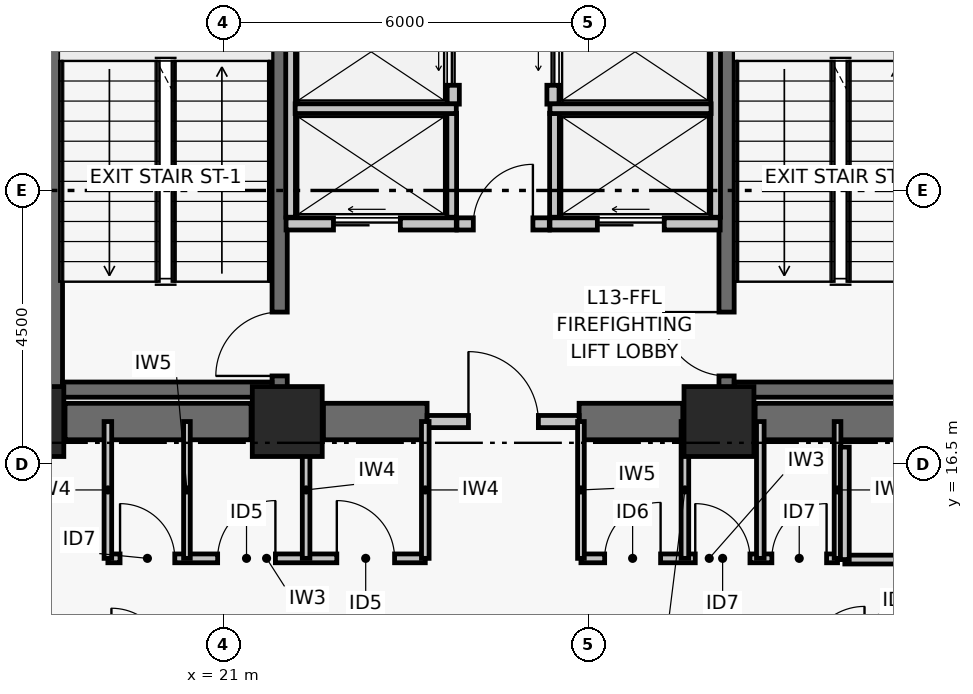
"""IFC4 building model, lengths in metres.
Left out: names, types, materials, properties, quantities, classifications, styles, units other than length and angle.
Written with IfcOpenShell. Run it as: python <this file> out.ifc"""

import sys

from ifc_helpers import new_model, si_unit, direction, frame, frame_2d, origin, origin_2d, place, context, subcontext, project, spatial, rectangle, extrude, element, fill, save


model = new_model("IFC4")
c1 = context("Model", 3, precision=1e-05, world=origin(), true_north=direction((0.0, 1.0)))
c2 = subcontext(c1, "Body", "Model", "MODEL_VIEW")
j1 = project(units=[si_unit("LENGTHUNIT", "METRE"), si_unit("PLANEANGLEUNIT", "RADIAN")], contexts=[c1])
p1 = place(None, origin())
s1 = spatial("IfcSite", under=j1, at=p1, CompositionType="ELEMENT")
p2 = place(p1, origin())
s2 = spatial("IfcBuilding", under=s1, at=p2, CompositionType="ELEMENT")
p3 = place(p2, frame((0.0, 0.0, 57.36)))
s3 = spatial("IfcBuildingStorey", under=s2, at=p3, CompositionType="ELEMENT", Elevation=57.36)
for number, where, z_axis, x_axis in (
    (1, (17.8, 17.2, 0.0), (0.0, 0.0, 1.0), (1.0, 0.0, 0.0)),
    (2, (22.05, 17.2, 0.0), (0.0, 0.0, 1.0), (1.0, 0.0, 0.0)),
    (3, (29.15, 17.2, 0.0), (0.0, 0.0, 1.0), (1.0, 0.0, 0.0)),
):
    element("IfcColumn", number, at=place(p3, frame(where, z_axis=z_axis, x_axis=x_axis)), inside=s3, PredefinedType="COLUMN", context=c2, shape_type="SweptSolid", body=[
        extrude(rectangle(XDim=1.15, YDim=1.15, at=origin_2d()), origin(), (0.0, 0.0, 1.0), 3.72),
    ])
p4 = place(p3, frame((18.395, 17.2, 0.0), z_axis=(0.0, 0.0, 1.0), x_axis=(1.0, 0.0, 0.0)))
e4 = element("IfcWall", 4, at=p4, inside=s3, PredefinedType="SHEAR", context=c2, shape_type="SweptSolid", body=[
    extrude(rectangle(XDim=3.06, YDim=0.6, at=frame_2d((1.53, 0.0))), origin(), (0.0, 0.0, 1.0), 3.47),
])
p5 = place(p3, frame((22.645, 17.2, 0.0), z_axis=(0.0, 0.0, 1.0), x_axis=(1.0, 0.0, 0.0)))
e5 = element("IfcWall", 5, at=p5, inside=s3, PredefinedType="SHEAR", context=c2, shape_type="SweptSolid", body=[
    extrude(rectangle(XDim=1.705, YDim=0.6, at=frame_2d((0.853, 0.0))), origin(), (0.0, 0.0, 1.0), 3.47),
])
p6 = place(p3, frame((26.85, 17.2, 0.0), z_axis=(0.0, 0.0, 1.0), x_axis=(1.0, 0.0, 0.0)))
e6 = element("IfcWall", 6, at=p6, inside=s3, PredefinedType="SHEAR", context=c2, shape_type="SweptSolid", body=[
    extrude(rectangle(XDim=1.705, YDim=0.6, at=frame_2d((0.853, 0.0))), origin(), (0.0, 0.0, 1.0), 3.47),
])
p7 = place(p3, frame((29.745, 17.2, 0.0), z_axis=(0.0, 0.0, 1.0), x_axis=(1.0, 0.0, 0.0)))
e7 = element("IfcWall", 7, at=p7, inside=s3, PredefinedType="SHEAR", context=c2, shape_type="SweptSolid", body=[
    extrude(rectangle(XDim=3.06, YDim=0.6, at=frame_2d((1.53, 0.0))), origin(), (0.0, 0.0, 1.0), 3.47),
])
p8 = place(p3, frame((18.229, 17.6, 0.0), z_axis=(0.0, 0.0, 1.0), x_axis=(0.0, 1.0, 0.0)))
e8 = element("IfcWall", 8, at=p8, inside=s3, PredefinedType="SHEAR", context=c2, shape_type="SweptSolid", body=[
    extrude(rectangle(XDim=8.8, YDim=0.25, at=frame_2d((4.4, 0.0))), origin(), (0.0, 0.0, 1.0), 3.47),
])
p9 = place(p3, frame((21.925, 17.6, 0.0), z_axis=(0.0, 0.0, 1.0), x_axis=(0.0, 1.0, 0.0)))
e9 = element("IfcWall", 9, at=p9, inside=s3, PredefinedType="SHEAR", context=c2, shape_type="SweptSolid", body=[
    extrude(rectangle(XDim=8.8, YDim=0.25, at=frame_2d((4.4, 0.0))), origin(), (0.0, 0.0, 1.0), 3.47),
])
p10 = place(p9, frame((0.35, 0.0, 0.0)))
e10 = element("IfcOpeningElement", 10, at=p10, cuts=e9, PredefinedType="OPENING", context=c2, shape_type="SweptSolid", body=[
    extrude(rectangle(XDim=1.05, YDim=2.08, at=frame_2d((0.525, 1.04))), frame((0.0, 0.135, 0.0), z_axis=(0.0, -1.0, 0.0), x_axis=(1.0, 0.0, 0.0)), (0.0, 0.0, 1.0), 0.27),
])
p11 = place(p3, frame((18.354, 17.725, 0.0), z_axis=(0.0, 0.0, 1.0), x_axis=(1.0, 0.0, 0.0)))
e11 = element("IfcWall", 11, at=p11, inside=s3, PredefinedType="SHEAR", context=c2, shape_type="SweptSolid", body=[
    extrude(rectangle(XDim=3.446, YDim=0.25, at=frame_2d((1.723, 0.0))), origin(), (0.0, 0.0, 1.0), 3.47),
])
p12 = place(p3, frame((29.275, 17.6, 0.0), z_axis=(0.0, 0.0, 1.0), x_axis=(0.0, 1.0, 0.0)))
e12 = element("IfcWall", 12, at=p12, inside=s3, PredefinedType="SHEAR", context=c2, shape_type="SweptSolid", body=[
    extrude(rectangle(XDim=8.8, YDim=0.25, at=frame_2d((4.4, 0.0))), origin(), (0.0, 0.0, 1.0), 3.47),
])
p13 = place(p12, frame((0.35, 0.0, 0.0)))
e13 = element("IfcOpeningElement", 13, at=p13, cuts=e12, PredefinedType="OPENING", context=c2, shape_type="SweptSolid", body=[
    extrude(rectangle(XDim=1.05, YDim=2.08, at=frame_2d((0.525, 1.04))), frame((0.0, 0.135, 0.0), z_axis=(0.0, -1.0, 0.0), x_axis=(1.0, 0.0, 0.0)), (0.0, 0.0, 1.0), 0.27),
])
p14 = place(p3, frame((29.4, 17.725, 0.0), z_axis=(0.0, 0.0, 1.0), x_axis=(1.0, 0.0, 0.0)))
e14 = element("IfcWall", 14, at=p14, inside=s3, PredefinedType="SHEAR", context=c2, shape_type="SweptSolid", body=[
    extrude(rectangle(XDim=3.446, YDim=0.25, at=frame_2d((1.723, 0.0))), origin(), (0.0, 0.0, 1.0), 3.47),
])
p15 = place(p3, frame((24.35, 17.2, 0.0), z_axis=(0.0, 0.0, 1.0), x_axis=(1.0, 0.0, 0.0)))
e15 = element("IfcWall", 15, at=p15, inside=s3, PredefinedType="PARTITIONING", context=c2, shape_type="SweptSolid", body=[
    extrude(rectangle(XDim=2.5, YDim=0.2, at=frame_2d((1.25, 0.0))), origin(), (0.0, 0.0, 1.0), 2.6),
])
p16 = place(p15, frame((0.68, 0.0, 0.0)))
e16 = element("IfcOpeningElement", 16, at=p16, cuts=e15, PredefinedType="OPENING", context=c2, shape_type="SweptSolid", body=[
    extrude(rectangle(XDim=1.15, YDim=2.08, at=frame_2d((0.575, 1.04))), frame((0.0, 0.11, 0.0), z_axis=(0.0, -1.0, 0.0), x_axis=(1.0, 0.0, 0.0)), (0.0, 0.0, 1.0), 0.22),
])
p17 = place(p3, frame((24.84, 20.45, 0.0), z_axis=(0.0, 0.0, 1.0), x_axis=(1.0, 0.0, 0.0)))
e17 = element("IfcWall", 17, at=p17, inside=s3, PredefinedType="PARTITIONING", context=c2, shape_type="SweptSolid", body=[
    extrude(rectangle(XDim=1.52, YDim=0.2, at=frame_2d((0.76, 0.0))), origin(), (0.0, 0.0, 1.0), 3.47),
])
p18 = place(p17, frame((0.27, 0.0, 0.0)))
e18 = element("IfcOpeningElement", 18, at=p18, cuts=e17, PredefinedType="OPENING", context=c2, shape_type="SweptSolid", body=[
    extrude(rectangle(XDim=0.98, YDim=2.06, at=frame_2d((0.49, 1.03))), frame((0.0, 0.11, 0.0), z_axis=(0.0, -1.0, 0.0), x_axis=(1.0, 0.0, 0.0)), (0.0, 0.0, 1.0), 0.22),
])
p19 = place(p3, frame((22.03, 20.45, 0.0), z_axis=(0.0, 0.0, 1.0), x_axis=(1.0, 0.0, 0.0)))
e19 = element("IfcWall", 19, at=p19, inside=s3, PredefinedType="PARTITIONING", context=c2, shape_type="SweptSolid", body=[
    extrude(rectangle(XDim=2.8, YDim=0.2, at=frame_2d((1.4, 0.0))), origin(), (0.0, 0.0, 1.0), 3.47),
])
p20 = place(p19, frame((0.78, 0.0, 0.0)))
e20 = element("IfcOpeningElement", 20, at=p20, cuts=e19, PredefinedType="OPENING", context=c2, shape_type="SweptSolid", body=[
    extrude(rectangle(XDim=1.1, YDim=2.08, at=frame_2d((0.55, 1.04))), frame((0.0, 0.11, 0.0), z_axis=(0.0, -1.0, 0.0), x_axis=(1.0, 0.0, 0.0)), (0.0, 0.0, 1.0), 0.22),
])
p21 = place(p3, frame((26.37, 20.45, 0.0), z_axis=(0.0, 0.0, 1.0), x_axis=(1.0, 0.0, 0.0)))
e21 = element("IfcWall", 21, at=p21, inside=s3, PredefinedType="PARTITIONING", context=c2, shape_type="SweptSolid", body=[
    extrude(rectangle(XDim=2.8, YDim=0.2, at=frame_2d((1.4, 0.0))), origin(), (0.0, 0.0, 1.0), 3.47),
])
p22 = place(p21, frame((0.78, 0.0, 0.0)))
e22 = element("IfcOpeningElement", 22, at=p22, cuts=e21, PredefinedType="OPENING", context=c2, shape_type="SweptSolid", body=[
    extrude(rectangle(XDim=1.1, YDim=2.08, at=frame_2d((0.55, 1.04))), frame((0.0, 0.11, 0.0), z_axis=(0.0, -1.0, 0.0), x_axis=(1.0, 0.0, 0.0)), (0.0, 0.0, 1.0), 0.22),
])
p23 = place(p3, frame((24.78, 22.42, 0.0), z_axis=(0.0, 0.0, 1.0), x_axis=(0.0, 1.0, 0.0)))
e23 = element("IfcWall", 23, at=p23, inside=s3, PredefinedType="PARTITIONING", context=c2, shape_type="SweptSolid", body=[
    extrude(rectangle(XDim=1.72, YDim=0.2, at=frame_2d((0.86, 0.0))), origin(), (0.0, 0.0, 1.0), 3.47),
])
p24 = place(p23, frame((0.31, 0.0, 0.0)))
e24 = element("IfcOpeningElement", 24, at=p24, cuts=e23, PredefinedType="OPENING", context=c2, shape_type="SweptSolid", body=[
    extrude(rectangle(XDim=1.1, YDim=2.08, at=frame_2d((0.55, 1.04))), frame((0.0, 0.11, 0.0), z_axis=(0.0, -1.0, 0.0), x_axis=(1.0, 0.0, 0.0)), (0.0, 0.0, 1.0), 0.22),
])
p25 = place(p3, frame((26.42, 22.42, 0.0), z_axis=(0.0, 0.0, 1.0), x_axis=(0.0, 1.0, 0.0)))
e25 = element("IfcWall", 25, at=p25, inside=s3, PredefinedType="PARTITIONING", context=c2, shape_type="SweptSolid", body=[
    extrude(rectangle(XDim=1.72, YDim=0.2, at=frame_2d((0.86, 0.0))), origin(), (0.0, 0.0, 1.0), 3.47),
])
p26 = place(p25, frame((0.31, 0.0, 0.0)))
e26 = element("IfcOpeningElement", 26, at=p26, cuts=e25, PredefinedType="OPENING", context=c2, shape_type="SweptSolid", body=[
    extrude(rectangle(XDim=1.1, YDim=2.08, at=frame_2d((0.55, 1.04))), frame((0.0, 0.11, 0.0), z_axis=(0.0, -1.0, 0.0), x_axis=(1.0, 0.0, 0.0)), (0.0, 0.0, 1.0), 0.22),
])
p27 = place(p3, frame((22.105, 20.56, 0.0), z_axis=(0.0, 0.0, 1.0), x_axis=(0.0, 1.0, 0.0)))
e27 = element("IfcWall", 27, at=p27, inside=s3, PredefinedType="PARTITIONING", context=c2, shape_type="SweptSolid", body=[
    extrude(rectangle(XDim=5.45, YDim=0.16, at=frame_2d((2.725, 0.0))), origin(), (0.0, 0.0, 1.0), 3.47),
])
p28 = place(p3, frame((24.755, 20.56, 0.0), z_axis=(0.0, 0.0, 1.0), x_axis=(0.0, 1.0, 0.0)))
e28 = element("IfcWall", 28, at=p28, inside=s3, PredefinedType="PARTITIONING", context=c2, shape_type="SweptSolid", body=[
    extrude(rectangle(XDim=1.71, YDim=0.16, at=frame_2d((0.855, 0.0))), origin(), (0.0, 0.0, 1.0), 3.47),
])
p29 = place(p3, frame((22.18, 22.345, 0.0), z_axis=(0.0, 0.0, 1.0), x_axis=(1.0, 0.0, 0.0)))
e29 = element("IfcWall", 29, at=p29, inside=s3, PredefinedType="PARTITIONING", context=c2, shape_type="SweptSolid", body=[
    extrude(rectangle(XDim=2.65, YDim=0.16, at=frame_2d((1.325, 0.0))), origin(), (0.0, 0.0, 1.0), 3.47),
])
p30 = place(p3, frame((29.095, 20.56, 0.0), z_axis=(0.0, 0.0, 1.0), x_axis=(0.0, 1.0, 0.0)))
e30 = element("IfcWall", 30, at=p30, inside=s3, PredefinedType="PARTITIONING", context=c2, shape_type="SweptSolid", body=[
    extrude(rectangle(XDim=5.45, YDim=0.16, at=frame_2d((2.725, 0.0))), origin(), (0.0, 0.0, 1.0), 3.47),
])
p31 = place(p3, frame((26.445, 20.56, 0.0), z_axis=(0.0, 0.0, 1.0), x_axis=(0.0, 1.0, 0.0)))
e31 = element("IfcWall", 31, at=p31, inside=s3, PredefinedType="PARTITIONING", context=c2, shape_type="SweptSolid", body=[
    extrude(rectangle(XDim=1.71, YDim=0.16, at=frame_2d((0.855, 0.0))), origin(), (0.0, 0.0, 1.0), 3.47),
])
p32 = place(p3, frame((26.37, 22.345, 0.0), z_axis=(0.0, 0.0, 1.0), x_axis=(1.0, 0.0, 0.0)))
e32 = element("IfcWall", 32, at=p32, inside=s3, PredefinedType="PARTITIONING", context=c2, shape_type="SweptSolid", body=[
    extrude(rectangle(XDim=2.65, YDim=0.16, at=frame_2d((1.325, 0.0))), origin(), (0.0, 0.0, 1.0), 3.47),
])
p33 = place(p3, frame((19.1, 14.95, 0.0), z_axis=(0.0, 0.0, 1.0), x_axis=(1.0, 0.0, 0.0)))
e33 = element("IfcWall", 33, at=p33, inside=s3, PredefinedType="PARTITIONING", context=c2, shape_type="SweptSolid", body=[
    extrude(rectangle(XDim=5.22, YDim=0.145, at=frame_2d((2.61, 0.0))), origin(), (0.0, 0.0, 1.0), 2.6),
])
p34 = place(p33, frame((0.2, 0.0, 0.0)))
e34 = element("IfcOpeningElement", 34, at=p34, cuts=e33, PredefinedType="OPENING", context=c2, shape_type="SweptSolid", body=[
    extrude(rectangle(XDim=0.9, YDim=2.02, at=frame_2d((0.45, 1.01))), frame((0.0, 0.083, 0.0), z_axis=(0.0, -1.0, 0.0), x_axis=(1.0, 0.0, 0.0)), (0.0, 0.0, 1.0), 0.165),
])
p35 = place(p33, frame((1.805, 0.0, 0.0)))
e35 = element("IfcOpeningElement", 35, at=p35, cuts=e33, PredefinedType="OPENING", context=c2, shape_type="SweptSolid", body=[
    extrude(rectangle(XDim=0.95, YDim=2.06, at=frame_2d((0.475, 1.03))), frame((0.0, 0.083, 0.0), z_axis=(0.0, -1.0, 0.0), x_axis=(1.0, 0.0, 0.0)), (0.0, 0.0, 1.0), 0.165),
])
p36 = place(p33, frame((3.765, 0.0, 0.0)))
e36 = element("IfcOpeningElement", 36, at=p36, cuts=e33, PredefinedType="OPENING", context=c2, shape_type="SweptSolid", body=[
    extrude(rectangle(XDim=0.95, YDim=2.06, at=frame_2d((0.475, 1.03))), frame((0.0, 0.083, 0.0), z_axis=(0.0, -1.0, 0.0), x_axis=(1.0, 0.0, 0.0)), (0.0, 0.0, 1.0), 0.165),
])
p37 = place(p3, frame((26.88, 14.95, 0.0), z_axis=(0.0, 0.0, 1.0), x_axis=(1.0, 0.0, 0.0)))
e37 = element("IfcWall", 37, at=p37, inside=s3, PredefinedType="PARTITIONING", context=c2, shape_type="SweptSolid", body=[
    extrude(rectangle(XDim=4.22, YDim=0.145, at=frame_2d((2.11, 0.0))), origin(), (0.0, 0.0, 1.0), 3.0),
])
p38 = place(p37, frame((0.39, 0.0, 0.0)))
e38 = element("IfcOpeningElement", 38, at=p38, cuts=e37, PredefinedType="OPENING", context=c2, shape_type="SweptSolid", body=[
    extrude(rectangle(XDim=0.92, YDim=2.05, at=frame_2d((0.46, 1.025))), frame((0.0, 0.083, 0.0), z_axis=(0.0, -1.0, 0.0), x_axis=(1.0, 0.0, 0.0)), (0.0, 0.0, 1.0), 0.165),
])
p39 = place(p37, frame((1.88, 0.0, 0.0)))
e39 = element("IfcOpeningElement", 39, at=p39, cuts=e37, PredefinedType="OPENING", context=c2, shape_type="SweptSolid", body=[
    extrude(rectangle(XDim=0.9, YDim=2.02, at=frame_2d((0.45, 1.01))), frame((0.0, 0.083, 0.0), z_axis=(0.0, -1.0, 0.0), x_axis=(1.0, 0.0, 0.0)), (0.0, 0.0, 1.0), 0.165),
])
p40 = place(p37, frame((3.14, 0.0, 0.0)))
e40 = element("IfcOpeningElement", 40, at=p40, cuts=e37, PredefinedType="OPENING", context=c2, shape_type="SweptSolid", body=[
    extrude(rectangle(XDim=0.9, YDim=2.02, at=frame_2d((0.45, 1.01))), frame((0.0, 0.083, 0.0), z_axis=(0.0, -1.0, 0.0), x_axis=(1.0, 0.0, 0.0)), (0.0, 0.0, 1.0), 0.165),
])
p41 = place(p3, frame((19.1, 14.95, 0.0), z_axis=(0.0, 0.0, 1.0), x_axis=(0.0, 1.0, 0.0)))
e41 = element("IfcWall", 41, at=p41, inside=s3, PredefinedType="PARTITIONING", context=c2, shape_type="SweptSolid", body=[
    extrude(rectangle(XDim=2.25, YDim=0.125, at=frame_2d((1.125, 0.0))), origin(), (0.0, 0.0, 1.0), 2.6),
])
p42 = place(p3, frame((20.4, 14.95, 0.0), z_axis=(0.0, 0.0, 1.0), x_axis=(0.0, 1.0, 0.0)))
e42 = element("IfcWall", 42, at=p42, inside=s3, PredefinedType="PARTITIONING", context=c2, shape_type="SweptSolid", body=[
    extrude(rectangle(XDim=2.25, YDim=0.11, at=frame_2d((1.125, 0.0))), origin(), (0.0, 0.0, 1.0), 2.6),
])
for number, where, z_axis, x_axis in (
    (43, (22.36, 14.95, 0.0), (0.0, 0.0, 1.0), (0.0, 1.0, 0.0)),
    (44, (24.32, 14.95, 0.0), (0.0, 0.0, 1.0), (0.0, 1.0, 0.0)),
):
    element("IfcWall", number, at=place(p3, frame(where, z_axis=z_axis, x_axis=x_axis)), inside=s3, PredefinedType="PARTITIONING", context=c2, shape_type="SweptSolid", body=[
        extrude(rectangle(XDim=2.25, YDim=0.125, at=frame_2d((1.125, 0.0))), origin(), (0.0, 0.0, 1.0), 2.6),
    ])
p43 = place(p3, frame((26.88, 14.95, 0.0), z_axis=(0.0, 0.0, 1.0), x_axis=(0.0, 1.0, 0.0)))
e45 = element("IfcWall", 45, at=p43, inside=s3, PredefinedType="PARTITIONING", context=c2, shape_type="SweptSolid", body=[
    extrude(rectangle(XDim=2.25, YDim=0.11, at=frame_2d((1.125, 0.0))), origin(), (0.0, 0.0, 1.0), 2.6),
])
for number, where, z_axis, x_axis in (
    (46, (28.59, 14.95, 0.0), (0.0, 0.0, 1.0), (0.0, 1.0, 0.0)),
    (47, (29.83, 14.95, 0.0), (0.0, 0.0, 1.0), (0.0, 1.0, 0.0)),
):
    element("IfcWall", number, at=place(p3, frame(where, z_axis=z_axis, x_axis=x_axis)), inside=s3, PredefinedType="PARTITIONING", context=c2, shape_type="SweptSolid", body=[
        extrude(rectangle(XDim=2.25, YDim=0.125, at=frame_2d((1.125, 0.0))), origin(), (0.0, 0.0, 1.0), 2.6),
    ])
p44 = place(p3, frame((31.1, 14.95, 0.0), z_axis=(0.0, 0.0, 1.0), x_axis=(0.0, 1.0, 0.0)))
e48 = element("IfcWall", 48, at=p44, inside=s3, PredefinedType="PARTITIONING", context=c2, shape_type="SweptSolid", body=[
    extrude(rectangle(XDim=2.25, YDim=0.11, at=frame_2d((1.125, 0.0))), origin(), (0.0, 0.0, 1.0), 2.6),
])
p45 = place(p3, frame((32.8, 14.93, 0.0), z_axis=(0.0, 0.0, 1.0), x_axis=(-1.0, 0.0, 0.0)))
e49 = element("IfcWall", 49, at=p45, inside=s3, PredefinedType="PARTITIONING", context=c2, shape_type="SweptSolid", body=[
    extrude(rectangle(XDim=1.58, YDim=0.145, at=frame_2d((0.79, 0.0))), origin(), (0.0, 0.0, 1.0), 2.85),
])
p46 = place(p3, frame((31.22, 14.93, 0.0), z_axis=(0.0, 0.0, 1.0), x_axis=(0.0, 1.0, 0.0)))
e50 = element("IfcWall", 50, at=p46, inside=s3, PredefinedType="PARTITIONING", context=c2, shape_type="SweptSolid", body=[
    extrude(rectangle(XDim=1.85, YDim=0.145, at=frame_2d((0.925, 0.0))), origin(), (0.0, 0.0, 1.0), 2.6),
])
p47 = place(p10, origin())
e51 = element("IfcDoor", 51, at=p47, inside=s3, OperationType="SINGLE_SWING_LEFT", PredefinedType="DOOR", context=c2, shape_type="SweptSolid", body=[
    extrude(rectangle(XDim=1.05, YDim=2.08, at=frame_2d((0.525, 1.04))), frame((0.0, 0.025, 0.0), z_axis=(0.0, -1.0, 0.0), x_axis=(1.0, 0.0, 0.0)), (0.0, 0.0, 1.0), 0.05),
])
fill(e10, e51)
p48 = place(p13, origin())
e52 = element("IfcDoor", 52, at=p48, inside=s3, OperationType="SINGLE_SWING_RIGHT", PredefinedType="DOOR", context=c2, shape_type="SweptSolid", body=[
    extrude(rectangle(XDim=1.05, YDim=2.08, at=frame_2d((0.525, 1.04))), frame((0.0, 0.025, 0.0), z_axis=(0.0, -1.0, 0.0), x_axis=(1.0, 0.0, 0.0)), (0.0, 0.0, 1.0), 0.05),
])
fill(e13, e52)
p49 = place(p16, origin())
e53 = element("IfcDoor", 53, at=p49, inside=s3, OperationType="SINGLE_SWING_LEFT", PredefinedType="DOOR", context=c2, shape_type="SweptSolid", body=[
    extrude(rectangle(XDim=1.15, YDim=2.08, at=frame_2d((0.575, 1.04))), frame((0.0, 0.025, 0.0), z_axis=(0.0, -1.0, 0.0), x_axis=(1.0, 0.0, 0.0)), (0.0, 0.0, 1.0), 0.05),
])
fill(e16, e53)
p50 = place(p18, origin())
e54 = element("IfcDoor", 54, at=p50, inside=s3, OperationType="SINGLE_SWING_RIGHT", PredefinedType="DOOR", context=c2, shape_type="SweptSolid", body=[
    extrude(rectangle(XDim=0.98, YDim=2.06, at=frame_2d((0.49, 1.03))), frame((0.0, 0.025, 0.0), z_axis=(0.0, -1.0, 0.0), x_axis=(1.0, 0.0, 0.0)), (0.0, 0.0, 1.0), 0.05),
])
fill(e18, e54)
p51 = place(p20, origin())
e55 = element("IfcDoor", 55, at=p51, inside=s3, OperationType="DOUBLE_DOOR_SLIDING", PredefinedType="DOOR", context=c2, shape_type="SweptSolid", body=[
    extrude(rectangle(XDim=1.1, YDim=2.08, at=frame_2d((0.55, 1.04))), frame((0.0, 0.025, 0.0), z_axis=(0.0, -1.0, 0.0), x_axis=(1.0, 0.0, 0.0)), (0.0, 0.0, 1.0), 0.05),
])
fill(e20, e55)
p52 = place(p22, origin())
e56 = element("IfcDoor", 56, at=p52, inside=s3, OperationType="DOUBLE_DOOR_SLIDING", PredefinedType="DOOR", context=c2, shape_type="SweptSolid", body=[
    extrude(rectangle(XDim=1.1, YDim=2.08, at=frame_2d((0.55, 1.04))), frame((0.0, 0.025, 0.0), z_axis=(0.0, -1.0, 0.0), x_axis=(1.0, 0.0, 0.0)), (0.0, 0.0, 1.0), 0.05),
])
fill(e22, e56)
p53 = place(p24, origin())
e57 = element("IfcDoor", 57, at=p53, inside=s3, OperationType="DOUBLE_DOOR_SLIDING", PredefinedType="DOOR", context=c2, shape_type="SweptSolid", body=[
    extrude(rectangle(XDim=1.1, YDim=2.08, at=frame_2d((0.55, 1.04))), frame((0.0, 0.025, 0.0), z_axis=(0.0, -1.0, 0.0), x_axis=(1.0, 0.0, 0.0)), (0.0, 0.0, 1.0), 0.05),
])
fill(e24, e57)
p54 = place(p26, origin())
e58 = element("IfcDoor", 58, at=p54, inside=s3, OperationType="DOUBLE_DOOR_SLIDING", PredefinedType="DOOR", context=c2, shape_type="SweptSolid", body=[
    extrude(rectangle(XDim=1.1, YDim=2.08, at=frame_2d((0.55, 1.04))), frame((0.0, 0.025, 0.0), z_axis=(0.0, -1.0, 0.0), x_axis=(1.0, 0.0, 0.0)), (0.0, 0.0, 1.0), 0.05),
])
fill(e26, e58)
p55 = place(p34, origin())
e59 = element("IfcDoor", 59, at=p55, inside=s3, OperationType="SINGLE_SWING_LEFT", PredefinedType="DOOR", context=c2, shape_type="SweptSolid", body=[
    extrude(rectangle(XDim=0.9, YDim=2.02, at=frame_2d((0.45, 1.01))), frame((0.0, 0.025, 0.0), z_axis=(0.0, -1.0, 0.0), x_axis=(1.0, 0.0, 0.0)), (0.0, 0.0, 1.0), 0.05),
])
fill(e34, e59)
p56 = place(p35, origin())
e60 = element("IfcDoor", 60, at=p56, inside=s3, OperationType="SINGLE_SWING_RIGHT", PredefinedType="DOOR", context=c2, shape_type="SweptSolid", body=[
    extrude(rectangle(XDim=0.95, YDim=2.06, at=frame_2d((0.475, 1.03))), frame((0.0, 0.025, 0.0), z_axis=(0.0, -1.0, 0.0), x_axis=(1.0, 0.0, 0.0)), (0.0, 0.0, 1.0), 0.05),
])
fill(e35, e60)
p57 = place(p36, origin())
e61 = element("IfcDoor", 61, at=p57, inside=s3, OperationType="SINGLE_SWING_LEFT", PredefinedType="DOOR", context=c2, shape_type="SweptSolid", body=[
    extrude(rectangle(XDim=0.95, YDim=2.06, at=frame_2d((0.475, 1.03))), frame((0.0, 0.025, 0.0), z_axis=(0.0, -1.0, 0.0), x_axis=(1.0, 0.0, 0.0)), (0.0, 0.0, 1.0), 0.05),
])
fill(e36, e61)
p58 = place(p38, origin())
e62 = element("IfcDoor", 62, at=p58, inside=s3, OperationType="SINGLE_SWING_RIGHT", PredefinedType="DOOR", context=c2, shape_type="SweptSolid", body=[
    extrude(rectangle(XDim=0.92, YDim=2.05, at=frame_2d((0.46, 1.025))), frame((0.0, 0.025, 0.0), z_axis=(0.0, -1.0, 0.0), x_axis=(1.0, 0.0, 0.0)), (0.0, 0.0, 1.0), 0.05),
])
fill(e38, e62)
p59 = place(p39, origin())
e63 = element("IfcDoor", 63, at=p59, inside=s3, OperationType="SINGLE_SWING_LEFT", PredefinedType="DOOR", context=c2, shape_type="SweptSolid", body=[
    extrude(rectangle(XDim=0.9, YDim=2.02, at=frame_2d((0.45, 1.01))), frame((0.0, 0.025, 0.0), z_axis=(0.0, -1.0, 0.0), x_axis=(1.0, 0.0, 0.0)), (0.0, 0.0, 1.0), 0.05),
])
fill(e39, e63)
p60 = place(p40, origin())
e64 = element("IfcDoor", 64, at=p60, inside=s3, OperationType="SINGLE_SWING_RIGHT", PredefinedType="DOOR", context=c2, shape_type="SweptSolid", body=[
    extrude(rectangle(XDim=0.9, YDim=2.02, at=frame_2d((0.45, 1.01))), frame((0.0, 0.025, 0.0), z_axis=(0.0, -1.0, 0.0), x_axis=(1.0, 0.0, 0.0)), (0.0, 0.0, 1.0), 0.05),
])
fill(e40, e64)
save(model, sys.argv[1])
